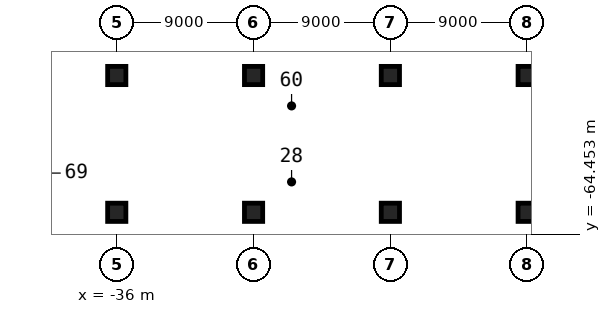
"""IFC4 building model, lengths in metres.
Left out: names, types, materials, properties, quantities, classifications, styles, units other than length and angle.
Written with IfcOpenShell. Run it as: python <this file> out.ifc"""

import sys

from ifc_helpers import new_model, si_unit, direction, frame, origin, origin_2d, place, context, subcontext, project, spatial, rectangle, extrude, element, save


model = new_model("IFC4")
c1 = context("Model", 3, precision=1e-05, world=origin(), true_north=direction((0.0, 1.0)))
c2 = subcontext(c1, "Body", "Model", "MODEL_VIEW")
j1 = project(units=[si_unit("LENGTHUNIT", "METRE"), si_unit("PLANEANGLEUNIT", "RADIAN")], contexts=[c1])
p1 = place(None, origin())
s1 = spatial("IfcSite", under=j1, at=p1, CompositionType="ELEMENT")
p2 = place(p1, origin())
s2 = spatial("IfcBuilding", under=s1, at=p2, CompositionType="ELEMENT")
p3 = place(p2, frame((0.0, 0.0, -4.5)))
s3 = spatial("IfcBuildingStorey", under=s2, at=p3, CompositionType="ELEMENT", Elevation=-4.5)
for number, where, z_axis, x_axis in (
    (1, (-36.0, -63.0, 0.0), (0.0, 0.0, 1.0), (1.0, 0.0, 0.0)),
    (2, (-36.0, -54.0, 0.0), (0.0, 0.0, 1.0), (1.0, 0.0, 0.0)),
    (3, (-27.0, -63.0, 0.0), (0.0, 0.0, 1.0), (1.0, 0.0, 0.0)),
    (4, (-27.0, -54.0, 0.0), (0.0, 0.0, 1.0), (1.0, 0.0, 0.0)),
    (5, (-18.0, -63.0, 0.0), (0.0, 0.0, 1.0), (1.0, 0.0, 0.0)),
    (6, (-18.0, -54.0, 0.0), (0.0, 0.0, 1.0), (1.0, 0.0, 0.0)),
    (7, (-9.0, -63.0, 0.0), (0.0, 0.0, 1.0), (1.0, 0.0, 0.0)),
    (8, (-9.0, -54.0, 0.0), (0.0, 0.0, 1.0), (1.0, 0.0, 0.0)),
):
    element("IfcColumn", number, at=place(p3, frame(where, z_axis=z_axis, x_axis=x_axis)), inside=s3, PredefinedType="COLUMN", context=c2, shape_type="SweptSolid", body=[
        extrude(rectangle(XDim=1.2, YDim=1.2, at=origin_2d()), origin(), (0.0, 0.0, 1.0), 4.5),
    ])
save(model, sys.argv[1])
